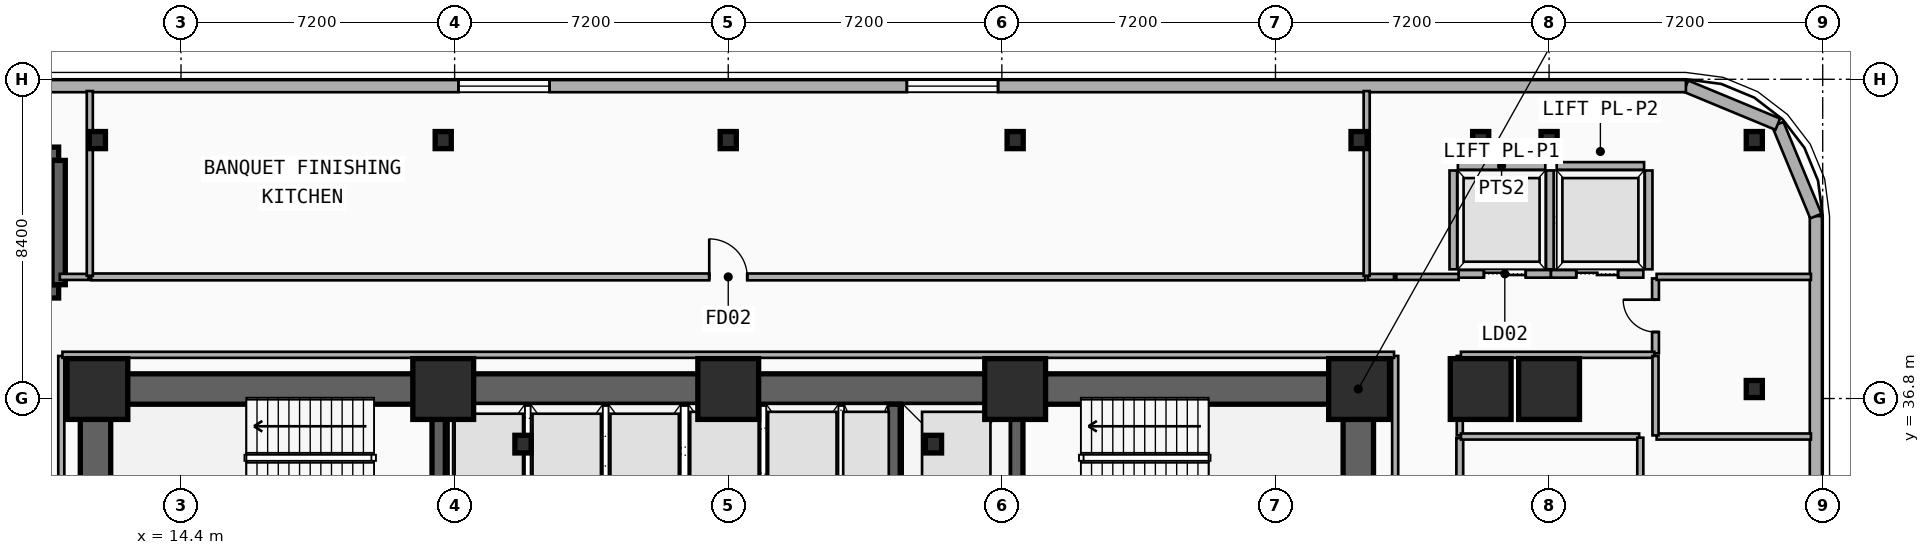
"""IFC4 building model, lengths in metres.
Left out: names, types, materials, properties, quantities, classifications, styles, units other than length and angle.
Written with IfcOpenShell. Run it as: python <this file> out.ifc"""

import sys

from ifc_helpers import new_model, si_unit, direction, frame, frame_2d, origin, origin_2d, place, context, subcontext, project, spatial, rectangle, i_section, extrude, element, fill, save


model = new_model("IFC4")
c1 = context("Model", 3, precision=1e-05, world=origin(), true_north=direction((0.0, 1.0)))
c2 = subcontext(c1, "Body", "Model", "MODEL_VIEW")
j1 = project(units=[si_unit("LENGTHUNIT", "METRE"), si_unit("PLANEANGLEUNIT", "RADIAN")], contexts=[c1])
p1 = place(None, origin())
s1 = spatial("IfcSite", under=j1, at=p1, CompositionType="ELEMENT")
p2 = place(p1, origin())
s2 = spatial("IfcBuilding", under=s1, at=p2, CompositionType="ELEMENT")
p3 = place(p2, frame((0.0, 0.0, 19.4)))
s3 = spatial("IfcBuildingStorey", under=s2, at=p3, CompositionType="ELEMENT", Elevation=19.4)
p4 = place(p3, frame((12.15, 37.05, 0.0), z_axis=(0.0, 0.0, 1.0), x_axis=(1.0, 0.0, 0.0)))
e1 = element("IfcWall", 1, at=p4, inside=s3, PredefinedType="SHEAR", context=c2, shape_type="SweptSolid", body=[
    extrude(rectangle(XDim=33.23, YDim=0.8, at=frame_2d((16.615, 0.0))), origin(), (0.0, 0.0, 1.0), 4.8),
])
for number, where, z_axis, x_axis in (
    (2, (12.15, 28.22, 0.0), (0.0, 0.0, 1.0), (0.0, 1.0, 0.0)),
    (3, (45.38, 28.22, 0.0), (0.0, 0.0, 1.0), (0.0, 1.0, 0.0)),
):
    element("IfcWall", number, at=place(p3, frame(where, z_axis=z_axis, x_axis=x_axis)), inside=s3, PredefinedType="SHEAR", context=c2, shape_type="SweptSolid", body=[
        extrude(rectangle(XDim=8.43, YDim=0.8, at=frame_2d((4.215, 0.0))), origin(), (0.0, 0.0, 1.0), 4.8),
    ])
for number, where, z_axis, x_axis in (
    (4, (21.18, 28.22, 0.0), (0.0, 0.0, 1.0), (0.0, 1.0, 0.0)),
    (5, (33.15, 28.22, 0.0), (0.0, 0.0, 1.0), (0.0, 1.0, 0.0)),
):
    element("IfcWall", number, at=place(p3, frame(where, z_axis=z_axis, x_axis=x_axis)), inside=s3, PredefinedType="SHEAR", context=c2, shape_type="SweptSolid", body=[
        extrude(rectangle(XDim=8.43, YDim=0.35, at=frame_2d((4.215, 0.0))), origin(), (0.0, 0.0, 1.0), 4.8),
    ])
p5 = place(p3, frame((36.38, 28.22, 0.0), z_axis=(0.0, 0.0, 1.0), x_axis=(0.0, 1.0, 0.0)))
e6 = element("IfcWall", 6, at=p5, inside=s3, PredefinedType="SHEAR", context=c2, shape_type="SweptSolid", body=[
    extrude(rectangle(XDim=8.43, YDim=0.35, at=frame_2d((4.215, 0.0))), origin(), (0.0, 0.0, 1.0), 4.8),
])
p6 = place(p5, frame((3.56, 0.0, 0.0)))
e7 = element("IfcOpeningElement", 7, at=p6, cuts=e6, PredefinedType="OPENING", context=c2, shape_type="SweptSolid", body=[
    extrude(rectangle(XDim=1.1, YDim=2.15, at=frame_2d((0.55, 1.075))), frame((0.0, 0.185, 0.0), z_axis=(0.0, -1.0, 0.0), x_axis=(1.0, 0.0, 0.0)), (0.0, 0.0, 1.0), 0.37),
])
p7 = place(p3, frame((1.62, 43.24, 0.0), z_axis=(0.0, 0.0, 1.0), x_axis=(1.0, 0.0, 0.0)))
e8 = element("IfcWall", 8, at=p7, inside=s3, PredefinedType="SHEAR", context=c2, shape_type="SweptSolid", body=[
    extrude(rectangle(XDim=9.56, YDim=0.35, at=frame_2d((4.78, 0.0))), origin(), (0.0, 0.0, 1.0), 4.8),
])
p8 = place(p3, frame((11.18, 39.62, 0.0), z_axis=(0.0, 0.0, 1.0), x_axis=(-1.0, 0.0, 0.0)))
e9 = element("IfcWall", 9, at=p8, inside=s3, PredefinedType="SHEAR", context=c2, shape_type="SweptSolid", body=[
    extrude(rectangle(XDim=9.56, YDim=0.35, at=frame_2d((4.78, 0.0))), origin(), (0.0, 0.0, 1.0), 4.8),
])
p9 = place(p8, frame((8.03, 0.0, 0.0)))
e10 = element("IfcOpeningElement", 10, at=p9, cuts=e9, PredefinedType="OPENING", context=c2, shape_type="SweptSolid", body=[
    extrude(rectangle(XDim=1.1, YDim=2.15, at=frame_2d((0.55, 1.075))), frame((0.0, 0.185, 0.0), z_axis=(0.0, -1.0, 0.0), x_axis=(1.0, 0.0, 0.0)), (0.0, 0.0, 1.0), 0.37),
])
p10 = place(p3, frame((11.18, 39.795, 0.0), z_axis=(0.0, 0.0, 1.0), x_axis=(0.0, 1.0, 0.0)))
e11 = element("IfcWall", 11, at=p10, inside=s3, PredefinedType="SHEAR", context=c2, shape_type="SweptSolid", body=[
    extrude(rectangle(XDim=3.27, YDim=0.35, at=frame_2d((1.635, 0.0))), origin(), (0.0, 0.0, 1.0), 4.8),
])
for number, where, z_axis, x_axis in (
    (12, (34.2, 35.6, 0.0), (0.0, 0.0, 1.0), (1.0, 0.0, 0.0)),
    (13, (23.4, 35.6, 0.0), (0.0, 0.0, 1.0), (1.0, 0.0, 0.0)),
):
    element("IfcColumn", number, at=place(p3, frame(where, z_axis=z_axis, x_axis=x_axis)), inside=s3, PredefinedType="COLUMN", context=c2, shape_type="SweptSolid", body=[
        extrude(i_section(OverallWidth=0.428, OverallDepth=0.465, WebThickness=0.045, FlangeThickness=0.073, FilletRadius=0.015, at=origin_2d()), origin(), (0.0, 0.0, 1.0), 4.8),
    ])
for number, where, z_axis, x_axis in (
    (14, (12.2, 37.05, 0.0), (0.0, 0.0, 1.0), (1.0, 0.0, 0.0)),
    (15, (21.3, 37.05, 0.0), (0.0, 0.0, 1.0), (1.0, 0.0, 0.0)),
    (16, (28.8, 37.05, 0.0), (0.0, 0.0, 1.0), (1.0, 0.0, 0.0)),
    (17, (36.35, 37.05, 0.0), (0.0, 0.0, 1.0), (1.0, 0.0, 0.0)),
    (18, (45.4, 37.05, 0.0), (0.0, 0.0, 1.0), (1.0, 0.0, 0.0)),
):
    element("IfcColumn", number, at=place(p3, frame(where, z_axis=z_axis, x_axis=x_axis)), inside=s3, PredefinedType="COLUMN", context=c2, shape_type="SweptSolid", body=[
        extrude(rectangle(XDim=1.6, YDim=1.6, at=origin_2d()), origin(), (0.0, 0.0, 1.0), 4.8),
    ])
for number, where, z_axis, x_axis in (
    (19, (12.2, 43.6, 0.0), (0.0, 0.0, 1.0), (1.0, 0.0, 0.0)),
    (20, (21.3, 43.6, 0.0), (0.0, 0.0, 1.0), (1.0, 0.0, 0.0)),
    (21, (28.8, 43.6, 0.0), (0.0, 0.0, 1.0), (1.0, 0.0, 0.0)),
    (22, (36.35, 43.6, 0.0), (0.0, 0.0, 1.0), (1.0, 0.0, 0.0)),
    (23, (45.4, 43.6, 0.0), (0.0, 0.0, 1.0), (1.0, 0.0, 0.0)),
):
    element("IfcColumn", number, at=place(p3, frame(where, z_axis=z_axis, x_axis=x_axis)), inside=s3, PredefinedType="COLUMN", context=c2, shape_type="SweptSolid", body=[
        extrude(i_section(OverallWidth=0.424, OverallDepth=0.45, WebThickness=0.041, FlangeThickness=0.065, FilletRadius=0.015, at=origin_2d()), origin(), (0.0, 0.0, 1.0), 4.8),
    ])
p11 = place(p3, frame((48.6, 37.05, 0.0), z_axis=(0.0, 0.0, 1.0), x_axis=(1.0, 0.0, 0.0)))
e24 = element("IfcColumn", 24, at=p11, inside=s3, PredefinedType="COLUMN", context=c2, shape_type="SweptSolid", body=[
    extrude(rectangle(XDim=1.6, YDim=1.6, at=origin_2d()), origin(), (0.0, 0.0, 1.0), 4.8),
])
p12 = place(p3, frame((48.6, 43.6, 0.0), z_axis=(0.0, 0.0, 1.0), x_axis=(1.0, 0.0, 0.0)))
e25 = element("IfcColumn", 25, at=p12, inside=s3, PredefinedType="COLUMN", context=c2, shape_type="SweptSolid", body=[
    extrude(i_section(OverallWidth=0.424, OverallDepth=0.45, WebThickness=0.041, FlangeThickness=0.065, FilletRadius=0.015, at=origin_2d()), origin(), (0.0, 0.0, 1.0), 4.8),
])
p13 = place(p3, frame((50.4, 37.05, 0.0), z_axis=(0.0, 0.0, 1.0), x_axis=(1.0, 0.0, 0.0)))
e26 = element("IfcColumn", 26, at=p13, inside=s3, PredefinedType="COLUMN", context=c2, shape_type="SweptSolid", body=[
    extrude(rectangle(XDim=1.6, YDim=1.6, at=origin_2d()), origin(), (0.0, 0.0, 1.0), 4.8),
])
for number, where, z_axis, x_axis in (
    (27, (50.4, 43.6, 0.0), (0.0, 0.0, 1.0), (1.0, 0.0, 0.0)),
    (28, (55.8, 37.05, 0.0), (0.0, 0.0, 1.0), (1.0, 0.0, 0.0)),
    (29, (55.8, 43.6, 0.0), (0.0, 0.0, 1.0), (1.0, 0.0, 0.0)),
):
    element("IfcColumn", number, at=place(p3, frame(where, z_axis=z_axis, x_axis=x_axis)), inside=s3, PredefinedType="COLUMN", context=c2, shape_type="SweptSolid", body=[
        extrude(i_section(OverallWidth=0.424, OverallDepth=0.45, WebThickness=0.041, FlangeThickness=0.065, FilletRadius=0.015, at=origin_2d()), origin(), (0.0, 0.0, 1.0), 4.8),
    ])
p14 = place(p3, frame((57.42, 41.6, 0.0), z_axis=(0.0, 0.0, 1.0), x_axis=(0.0, -1.0, 0.0)))
e30 = element("IfcWall", 30, at=p14, inside=s3, PredefinedType="SOLIDWALL", context=c2, shape_type="SweptSolid", body=[
    extrude(rectangle(XDim=34.4, YDim=0.32, at=frame_2d((17.2, 0.0))), origin(), (0.0, 0.0, 1.0), 4.5),
])
p15 = place(p14, frame((20.727, 0.0, 0.9)))
e31 = element("IfcOpeningElement", 31, at=p15, cuts=e30, PredefinedType="OPENING", context=c2, shape_type="SweptSolid", body=[
    extrude(rectangle(XDim=2.4, YDim=1.8, at=frame_2d((1.2, 0.9))), frame((0.0, 0.17, 0.0), z_axis=(0.0, -1.0, 0.0), x_axis=(1.0, 0.0, 0.0)), (0.0, 0.0, 1.0), 0.34),
])
p16 = place(p14, frame((27.403, 0.0, 0.9)))
e32 = element("IfcOpeningElement", 32, at=p16, cuts=e30, PredefinedType="OPENING", context=c2, shape_type="SweptSolid", body=[
    extrude(rectangle(XDim=2.4, YDim=1.8, at=frame_2d((1.2, 0.9))), frame((0.0, 0.17, 0.0), z_axis=(0.0, -1.0, 0.0), x_axis=(1.0, 0.0, 0.0)), (0.0, 0.0, 1.0), 0.34),
])
for number, where, z_axis, x_axis in (
    (33, (56.418, 44.018, 0.0), (0.0, 0.0, 1.0), (0.383, -0.924, 0.0)),
    (34, (54.0, 45.02, 0.0), (0.0, 0.0, 1.0), (0.924, -0.383, 0.0)),
):
    element("IfcWall", number, at=place(p3, frame(where, z_axis=z_axis, x_axis=x_axis)), inside=s3, PredefinedType="SOLIDWALL", context=c2, shape_type="SweptSolid", body=[
        extrude(rectangle(XDim=2.617, YDim=0.32, at=frame_2d((1.309, 0.0))), origin(), (0.0, 0.0, 1.0), 4.5),
    ])
p17 = place(p3, frame((3.6, 45.02, 0.0), z_axis=(0.0, 0.0, 1.0), x_axis=(1.0, 0.0, 0.0)))
e35 = element("IfcWall", 35, at=p17, inside=s3, PredefinedType="SOLIDWALL", context=c2, shape_type="SweptSolid", body=[
    extrude(rectangle(XDim=50.4, YDim=0.32, at=frame_2d((25.2, 0.0))), origin(), (0.0, 0.0, 1.0), 4.5),
])
p18 = place(p17, frame((18.1, 0.0, 0.9)))
e36 = element("IfcOpeningElement", 36, at=p18, cuts=e35, PredefinedType="OPENING", context=c2, shape_type="SweptSolid", body=[
    extrude(rectangle(XDim=2.4, YDim=1.8, at=frame_2d((1.2, 0.9))), frame((0.0, 0.17, 0.0), z_axis=(0.0, -1.0, 0.0), x_axis=(1.0, 0.0, 0.0)), (0.0, 0.0, 1.0), 0.34),
])
p19 = place(p17, frame((29.9, 0.0, 0.9)))
e37 = element("IfcOpeningElement", 37, at=p19, cuts=e35, PredefinedType="OPENING", context=c2, shape_type="SweptSolid", body=[
    extrude(rectangle(XDim=2.4, YDim=1.8, at=frame_2d((1.2, 0.9))), frame((0.0, 0.17, 0.0), z_axis=(0.0, -1.0, 0.0), x_axis=(1.0, 0.0, 0.0)), (0.0, 0.0, 1.0), 0.34),
])
p20 = place(p3, frame((48.02, 40.08, 0.0), z_axis=(0.0, 0.0, 1.0), x_axis=(1.0, 0.0, 0.0)))
e38 = element("IfcWall", 38, at=p20, inside=s3, PredefinedType="PARTITIONING", context=c2, shape_type="SweptSolid", body=[
    extrude(rectangle(XDim=2.43, YDim=0.2, at=frame_2d((1.215, 0.0))), origin(), (0.0, 0.0, 1.0), 4.5),
])
p21 = place(p20, frame((0.665, 0.0, 0.0)))
e39 = element("IfcOpeningElement", 39, at=p21, cuts=e38, PredefinedType="OPENING", context=c2, shape_type="SweptSolid", body=[
    extrude(rectangle(XDim=1.1, YDim=2.15, at=frame_2d((0.55, 1.075))), frame((0.0, 0.11, 0.0), z_axis=(0.0, -1.0, 0.0), x_axis=(1.0, 0.0, 0.0)), (0.0, 0.0, 1.0), 0.22),
])
p22 = place(p3, frame((48.0, 42.92, 0.0), z_axis=(0.0, 0.0, 1.0), x_axis=(1.0, 0.0, 0.0)))
e40 = element("IfcWall", 40, at=p22, inside=s3, PredefinedType="PARTITIONING", context=c2, shape_type="SweptSolid", body=[
    extrude(rectangle(XDim=2.3, YDim=0.2, at=frame_2d((1.15, 0.0))), origin(), (0.0, 0.0, 1.0), 4.5),
])
for number, where, z_axis, x_axis in (
    (41, (47.88, 40.2, 0.0), (0.0, 0.0, 1.0), (0.0, 1.0, 0.0)),
    (42, (50.42, 40.2, 0.0), (0.0, 0.0, 1.0), (0.0, 1.0, 0.0)),
):
    element("IfcWall", number, at=place(p3, frame(where, z_axis=z_axis, x_axis=x_axis)), inside=s3, PredefinedType="PARTITIONING", context=c2, shape_type="SweptSolid", body=[
        extrude(rectangle(XDim=2.6, YDim=0.2, at=frame_2d((1.3, 0.0))), origin(), (0.0, 0.0, 1.0), 4.5),
    ])
p23 = place(p3, frame((50.45, 40.08, 0.0), z_axis=(0.0, 0.0, 1.0), x_axis=(1.0, 0.0, 0.0)))
e43 = element("IfcWall", 43, at=p23, inside=s3, PredefinedType="PARTITIONING", context=c2, shape_type="SweptSolid", body=[
    extrude(rectangle(XDim=2.43, YDim=0.2, at=frame_2d((1.215, 0.0))), origin(), (0.0, 0.0, 1.0), 4.5),
])
p24 = place(p23, frame((0.665, 0.0, 0.0)))
e44 = element("IfcOpeningElement", 44, at=p24, cuts=e43, PredefinedType="OPENING", context=c2, shape_type="SweptSolid", body=[
    extrude(rectangle(XDim=1.1, YDim=2.15, at=frame_2d((0.55, 1.075))), frame((0.0, 0.11, 0.0), z_axis=(0.0, -1.0, 0.0), x_axis=(1.0, 0.0, 0.0)), (0.0, 0.0, 1.0), 0.22),
])
p25 = place(p3, frame((50.6, 42.92, 0.0), z_axis=(0.0, 0.0, 1.0), x_axis=(1.0, 0.0, 0.0)))
e45 = element("IfcWall", 45, at=p25, inside=s3, PredefinedType="PARTITIONING", context=c2, shape_type="SweptSolid", body=[
    extrude(rectangle(XDim=2.3, YDim=0.2, at=frame_2d((1.15, 0.0))), origin(), (0.0, 0.0, 1.0), 4.5),
])
p26 = place(p3, frame((53.02, 40.2, 0.0), z_axis=(0.0, 0.0, 1.0), x_axis=(0.0, 1.0, 0.0)))
e46 = element("IfcWall", 46, at=p26, inside=s3, PredefinedType="PARTITIONING", context=c2, shape_type="SweptSolid", body=[
    extrude(rectangle(XDim=2.6, YDim=0.2, at=frame_2d((1.3, 0.0))), origin(), (0.0, 0.0, 1.0), 4.5),
])
p27 = place(p3, frame((48.05, 31.64, 0.0), z_axis=(0.0, 0.0, 1.0), x_axis=(0.0, 1.0, 0.0)))
e47 = element("IfcWall", 47, at=p27, inside=s3, PredefinedType="PLUMBINGWALL", context=c2, shape_type="SweptSolid", body=[
    extrude(rectangle(XDim=4.12, YDim=0.18, at=frame_2d((2.06, 0.0))), origin(), (0.0, 0.0, 1.0), 4.5),
])
p28 = place(p27, frame((1.635, 0.0, 0.0)))
e48 = element("IfcOpeningElement", 48, at=p28, cuts=e47, PredefinedType="OPENING", context=c2, shape_type="SweptSolid", body=[
    extrude(rectangle(XDim=0.85, YDim=2.1, at=frame_2d((0.425, 1.05))), frame((0.0, 0.1, 0.0), z_axis=(0.0, -1.0, 0.0), x_axis=(1.0, 0.0, 0.0)), (0.0, 0.0, 1.0), 0.2),
])
p29 = place(p3, frame((12.04, 40.0, 0.0), z_axis=(0.0, 0.0, 1.0), x_axis=(1.0, 0.0, 0.0)))
e49 = element("IfcWall", 49, at=p29, inside=s3, PredefinedType="PLUMBINGWALL", context=c2, shape_type="SweptSolid", body=[
    extrude(rectangle(XDim=33.52, YDim=0.18, at=frame_2d((16.76, 0.0))), origin(), (0.0, 0.0, 1.0), 3.83),
])
p30 = place(p29, frame((16.26, 0.0, 0.0)))
e50 = element("IfcOpeningElement", 50, at=p30, cuts=e49, PredefinedType="OPENING", context=c2, shape_type="SweptSolid", body=[
    extrude(rectangle(XDim=1.0, YDim=2.15, at=frame_2d((0.5, 1.075))), frame((0.0, 0.1, 0.0), z_axis=(0.0, -1.0, 0.0), x_axis=(1.0, 0.0, 0.0)), (0.0, 0.0, 1.0), 0.2),
])
p31 = place(p3, frame((53.2, 37.99, 0.0), z_axis=(0.0, 0.0, 1.0), x_axis=(0.0, 1.0, 0.0)))
e51 = element("IfcWall", 51, at=p31, inside=s3, PredefinedType="PLUMBINGWALL", context=c2, shape_type="SweptSolid", body=[
    extrude(rectangle(XDim=1.97, YDim=0.18, at=frame_2d((0.985, 0.0))), origin(), (0.0, 0.0, 1.0), 4.5),
])
p32 = place(p31, frame((0.56, 0.0, 0.0)))
e52 = element("IfcOpeningElement", 52, at=p32, cuts=e51, PredefinedType="OPENING", context=c2, shape_type="SweptSolid", body=[
    extrude(rectangle(XDim=0.85, YDim=2.1, at=frame_2d((0.425, 1.05))), frame((0.0, 0.1, 0.0), z_axis=(0.0, -1.0, 0.0), x_axis=(1.0, 0.0, 0.0)), (0.0, 0.0, 1.0), 0.2),
])
p33 = place(p3, frame((11.25, 27.63, 0.0), z_axis=(0.0, 0.0, 1.0), x_axis=(0.0, 1.0, 0.0)))
e53 = element("IfcWall", 53, at=p33, inside=s3, PredefinedType="PARTITIONING", context=c2, shape_type="SweptSolid", body=[
    extrude(rectangle(XDim=10.29, YDim=0.16, at=frame_2d((5.145, 0.0))), origin(), (0.0, 0.0, 1.0), 4.5),
])
p34 = place(p3, frame((46.38, 40.0, 0.0), z_axis=(0.0, 0.0, 1.0), x_axis=(1.0, 0.0, 0.0)))
e54 = element("IfcWall", 54, at=p34, inside=s3, PredefinedType="PARTITIONING", context=c2, shape_type="SweptSolid", body=[
    extrude(rectangle(XDim=1.64, YDim=0.16, at=frame_2d((0.82, 0.0))), origin(), (0.0, 0.0, 1.0), 4.5),
])
p35 = place(p3, frame((46.35, 27.63, 0.0), z_axis=(0.0, 0.0, 1.0), x_axis=(0.0, 1.0, 0.0)))
e55 = element("IfcWall", 55, at=p35, inside=s3, PredefinedType="PARTITIONING", context=c2, shape_type="SweptSolid", body=[
    extrude(rectangle(XDim=10.29, YDim=0.16, at=frame_2d((5.145, 0.0))), origin(), (0.0, 0.0, 1.0), 4.5),
])
p36 = place(p3, frame((48.05, 35.83, 0.0), z_axis=(0.0, 0.0, 1.0), x_axis=(0.0, 1.0, 0.0)))
e56 = element("IfcWall", 56, at=p36, inside=s3, PredefinedType="PARTITIONING", context=c2, shape_type="SweptSolid", body=[
    extrude(rectangle(XDim=2.09, YDim=0.16, at=frame_2d((1.045, 0.0))), origin(), (0.0, 0.0, 1.0), 4.5),
])
p37 = place(p3, frame((11.28, 37.95, 0.0), z_axis=(0.0, 0.0, 1.0), x_axis=(1.0, 0.0, 0.0)))
e57 = element("IfcWall", 57, at=p37, inside=s3, PredefinedType="PARTITIONING", context=c2, shape_type="SweptSolid", body=[
    extrude(rectangle(XDim=35.04, YDim=0.16, at=frame_2d((17.52, 0.0))), origin(), (0.0, 0.0, 1.0), 3.83),
])
p38 = place(p3, frame((11.21, 40.0, 0.0), z_axis=(0.0, 0.0, 1.0), x_axis=(1.0, 0.0, 0.0)))
e58 = element("IfcWall", 58, at=p38, inside=s3, PredefinedType="PARTITIONING", context=c2, shape_type="SweptSolid", body=[
    extrude(rectangle(XDim=0.76, YDim=0.16, at=frame_2d((0.38, 0.0))), origin(), (0.0, 0.0, 1.0), 3.83),
])
p39 = place(p3, frame((45.63, 40.0, 0.0), z_axis=(0.0, 0.0, 1.0), x_axis=(1.0, 0.0, 0.0)))
e59 = element("IfcWall", 59, at=p39, inside=s3, PredefinedType="PARTITIONING", context=c2, shape_type="SweptSolid", body=[
    extrude(rectangle(XDim=0.69, YDim=0.16, at=frame_2d((0.345, 0.0))), origin(), (0.0, 0.0, 1.0), 3.83),
])
p40 = place(p3, frame((48.08, 37.95, 0.0), z_axis=(0.0, 0.0, 1.0), x_axis=(1.0, 0.0, 0.0)))
e60 = element("IfcWall", 60, at=p40, inside=s3, PredefinedType="PARTITIONING", context=c2, shape_type="SweptSolid", body=[
    extrude(rectangle(XDim=5.09, YDim=0.16, at=frame_2d((2.545, 0.0))), origin(), (0.0, 0.0, 1.0), 4.5),
])
p41 = place(p3, frame((48.08, 35.8, 0.0), z_axis=(0.0, 0.0, 1.0), x_axis=(1.0, 0.0, 0.0)))
e61 = element("IfcWall", 61, at=p41, inside=s3, PredefinedType="PARTITIONING", context=c2, shape_type="SweptSolid", body=[
    extrude(rectangle(XDim=4.69, YDim=0.16, at=frame_2d((2.345, 0.0))), origin(), (0.0, 0.0, 1.0), 4.5),
])
p42 = place(p3, frame((52.8, 31.63, 0.0), z_axis=(0.0, 0.0, 1.0), x_axis=(0.0, 1.0, 0.0)))
e62 = element("IfcWall", 62, at=p42, inside=s3, PredefinedType="PARTITIONING", context=c2, shape_type="SweptSolid", body=[
    extrude(rectangle(XDim=4.14, YDim=0.16, at=frame_2d((2.07, 0.0))), origin(), (0.0, 0.0, 1.0), 4.5),
])
for number, where, z_axis, x_axis in (
    (63, (53.23, 35.8, 0.0), (0.0, 0.0, 1.0), (1.0, 0.0, 0.0)),
    (64, (53.23, 40.0, 0.0), (0.0, 0.0, 1.0), (1.0, 0.0, 0.0)),
):
    element("IfcWall", number, at=place(p3, frame(where, z_axis=z_axis, x_axis=x_axis)), inside=s3, PredefinedType="PARTITIONING", context=c2, shape_type="SweptSolid", body=[
        extrude(rectangle(XDim=4.06, YDim=0.16, at=frame_2d((2.03, 0.0))), origin(), (0.0, 0.0, 1.0), 4.5),
    ])
p43 = place(p3, frame((53.2, 35.83, 0.0), z_axis=(0.0, 0.0, 1.0), x_axis=(0.0, 1.0, 0.0)))
e65 = element("IfcWall", 65, at=p43, inside=s3, PredefinedType="PARTITIONING", context=c2, shape_type="SweptSolid", body=[
    extrude(rectangle(XDim=2.09, YDim=0.16, at=frame_2d((1.045, 0.0))), origin(), (0.0, 0.0, 1.0), 4.5),
])
for number, where, z_axis, x_axis in (
    (66, (12.0, 40.03, 0.0), (0.0, 0.0, 1.0), (0.0, 1.0, 0.0)),
    (67, (45.6, 40.03, 0.0), (0.0, 0.0, 1.0), (0.0, 1.0, 0.0)),
):
    element("IfcWall", number, at=place(p3, frame(where, z_axis=z_axis, x_axis=x_axis)), inside=s3, PredefinedType="PARTITIONING", context=c2, shape_type="SweptSolid", body=[
        extrude(rectangle(XDim=4.86, YDim=0.16, at=frame_2d((2.43, 0.0))), origin(), (0.0, 0.0, 1.0), 3.83),
    ])
p44 = place(p18, origin())
e68 = element("IfcWindow", 68, at=p44, inside=s3, PartitioningType="SINGLE_PANEL", PredefinedType="WINDOW", context=c2, shape_type="SweptSolid", body=[
    extrude(rectangle(XDim=2.4, YDim=1.8, at=frame_2d((1.2, 0.9))), frame((0.0, 0.03, 0.0), z_axis=(0.0, -1.0, 0.0), x_axis=(1.0, 0.0, 0.0)), (0.0, 0.0, 1.0), 0.06),
])
fill(e36, e68)
p45 = place(p19, origin())
e69 = element("IfcWindow", 69, at=p45, inside=s3, PartitioningType="SINGLE_PANEL", PredefinedType="WINDOW", context=c2, shape_type="SweptSolid", body=[
    extrude(rectangle(XDim=2.4, YDim=1.8, at=frame_2d((1.2, 0.9))), frame((0.0, 0.03, 0.0), z_axis=(0.0, -1.0, 0.0), x_axis=(1.0, 0.0, 0.0)), (0.0, 0.0, 1.0), 0.06),
])
fill(e37, e69)
p46 = place(p21, origin())
e70 = element("IfcDoor", 70, at=p46, inside=s3, OperationType="DOUBLE_DOOR_SLIDING", PredefinedType="DOOR", context=c2, shape_type="SweptSolid", body=[
    extrude(rectangle(XDim=1.1, YDim=2.15, at=frame_2d((0.55, 1.075))), frame((0.0, 0.025, 0.0), z_axis=(0.0, -1.0, 0.0), x_axis=(1.0, 0.0, 0.0)), (0.0, 0.0, 1.0), 0.05),
])
fill(e39, e70)
p47 = place(p24, origin())
e71 = element("IfcDoor", 71, at=p47, inside=s3, OperationType="DOUBLE_DOOR_SLIDING", PredefinedType="DOOR", context=c2, shape_type="SweptSolid", body=[
    extrude(rectangle(XDim=1.1, YDim=2.15, at=frame_2d((0.55, 1.075))), frame((0.0, 0.025, 0.0), z_axis=(0.0, -1.0, 0.0), x_axis=(1.0, 0.0, 0.0)), (0.0, 0.0, 1.0), 0.05),
])
fill(e44, e71)
p48 = place(p30, origin())
e72 = element("IfcDoor", 72, at=p48, inside=s3, OperationType="SINGLE_SWING_LEFT", PredefinedType="DOOR", context=c2, shape_type="SweptSolid", body=[
    extrude(rectangle(XDim=1.0, YDim=2.15, at=frame_2d((0.5, 1.075))), frame((0.0, 0.025, 0.0), z_axis=(0.0, -1.0, 0.0), x_axis=(1.0, 0.0, 0.0)), (0.0, 0.0, 1.0), 0.05),
])
fill(e50, e72)
p49 = place(p32, origin())
e73 = element("IfcDoor", 73, at=p49, inside=s3, OperationType="SINGLE_SWING_RIGHT", PredefinedType="DOOR", context=c2, shape_type="SweptSolid", body=[
    extrude(rectangle(XDim=0.85, YDim=2.1, at=frame_2d((0.425, 1.05))), frame((0.0, 0.025, 0.0), z_axis=(0.0, -1.0, 0.0), x_axis=(1.0, 0.0, 0.0)), (0.0, 0.0, 1.0), 0.05),
])
fill(e52, e73)
save(model, sys.argv[1])
